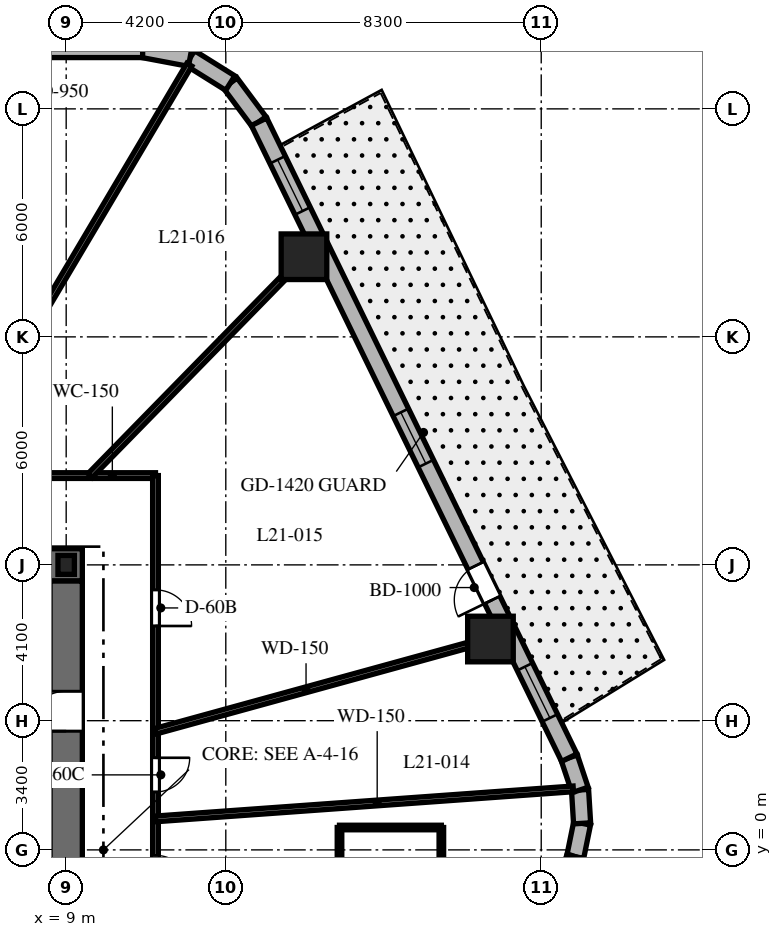
"""IFC4 building model, lengths in metres.
Left out: names, types, materials, properties, quantities, classifications, styles, units other than length and angle.
Written with IfcOpenShell. Run it as: python <this file> out.ifc"""

import sys

from ifc_helpers import new_model, si_unit, direction, frame, frame_2d, origin, origin_2d, place, context, subcontext, project, spatial, rectangle, i_section, extrude, element, fill, save


model = new_model("IFC4")
c1 = context("Model", 3, precision=1e-05, world=origin(), true_north=direction((0.0, 1.0)))
c2 = subcontext(c1, "Body", "Model", "MODEL_VIEW")
j1 = project(units=[si_unit("LENGTHUNIT", "METRE"), si_unit("PLANEANGLEUNIT", "RADIAN")], contexts=[c1])
p1 = place(None, origin())
s1 = spatial("IfcSite", under=j1, at=p1, CompositionType="ELEMENT")
p2 = place(p1, origin())
s2 = spatial("IfcBuilding", under=s1, at=p2, CompositionType="ELEMENT")
p3 = place(p2, frame((0.0, 0.0, 91.4)))
s3 = spatial("IfcBuildingStorey", under=s2, at=p3, CompositionType="ELEMENT", Elevation=91.4)
p4 = place(p3, frame((1.85, 7.5, 0.0), z_axis=(0.0, 0.0, 1.0), x_axis=(1.0, 0.0, 0.0)))
e1 = element("IfcWall", 1, at=p4, inside=s3, PredefinedType="SHEAR", context=c2, shape_type="SweptSolid", body=[
    extrude(rectangle(XDim=7.575, YDim=0.85, at=frame_2d((3.788, 0.0))), origin(), (0.0, 0.0, 1.0), 3.7),
])
p5 = place(p3, frame((9.0, -7.075, 0.0), z_axis=(0.0, 0.0, 1.0), x_axis=(0.0, 1.0, 0.0)))
e2 = element("IfcWall", 2, at=p5, inside=s3, PredefinedType="SHEAR", context=c2, shape_type="SweptSolid", body=[
    extrude(rectangle(XDim=14.15, YDim=0.85, at=frame_2d((7.075, 0.0))), origin(), (0.0, 0.0, 1.0), 3.7),
])
p6 = place(p5, frame((10.2, 0.0, 0.0)))
e3 = element("IfcOpeningElement", 3, at=p6, cuts=e2, PredefinedType="OPENING", context=c2, shape_type="SweptSolid", body=[
    extrude(rectangle(XDim=1.05, YDim=2.15, at=frame_2d((0.525, 1.075))), frame((0.0, 0.435, 0.0), z_axis=(0.0, -1.0, 0.0), x_axis=(1.0, 0.0, 0.0)), (0.0, 0.0, 1.0), 0.87),
])
p7 = place(p3, frame((9.0, 7.5, 0.0), z_axis=(0.0, 0.0, 1.0), x_axis=(1.0, 0.0, 0.0)))
e4 = element("IfcColumn", 4, at=p7, inside=s3, PredefinedType="COLUMN", context=c2, shape_type="SweptSolid", body=[
    extrude(i_section(OverallWidth=0.432, OverallDepth=0.498, WebThickness=0.056, FlangeThickness=0.089, at=origin_2d()), origin(), (0.0, 0.0, 1.0), 3.7),
])
for number, where, z_axis, x_axis in (
    (5, (20.164, 5.549, 0.0), (0.0, 0.0, 1.0), (1.0, 0.0, 0.0)),
    (6, (15.257, 15.609, 0.0), (0.0, 0.0, 1.0), (1.0, 0.0, 0.0)),
):
    element("IfcColumn", number, at=place(p3, frame(where, z_axis=z_axis, x_axis=x_axis)), inside=s3, PredefinedType="COLUMN", context=c2, shape_type="SweptSolid", body=[
        extrude(rectangle(XDim=1.2, YDim=1.2, at=origin_2d()), origin(), (0.0, 0.0, 1.0), 3.7),
    ])
p8 = place(p3, frame((22.397, -0.179, 0.0), z_axis=(0.0, 0.0, 1.0), x_axis=(0.199313589404, 0.979935759669, 0.0)))
e7 = element("IfcWall", 7, at=p8, inside=s3, PredefinedType="SOLIDWALL", context=c2, shape_type="SweptSolid", body=[
    extrude(rectangle(XDim=0.896, YDim=0.45, at=frame_2d((0.448, 0.0))), origin(), (0.0, 0.0, 1.0), 3.4),
])
p9 = place(p3, frame((22.575, 0.698, 0.0), z_axis=(0.0, 0.0, 1.0), x_axis=(-0.060980441946, 0.998138961117, 0.0)))
e8 = element("IfcWall", 8, at=p9, inside=s3, PredefinedType="SOLIDWALL", context=c2, shape_type="SweptSolid", body=[
    extrude(rectangle(XDim=0.881, YDim=0.45, at=frame_2d((0.44, 0.0))), origin(), (0.0, 0.0, 1.0), 3.4),
])
p10 = place(p3, frame((22.522, 1.577, 0.0), z_axis=(0.0, 0.0, 1.0), x_axis=(-0.317372694837, 0.948300887151, 0.0)))
e9 = element("IfcWall", 9, at=p10, inside=s3, PredefinedType="SOLIDWALL", context=c2, shape_type="SweptSolid", body=[
    extrude(rectangle(XDim=0.896, YDim=0.45, at=frame_2d((0.448, 0.0))), origin(), (0.0, 0.0, 1.0), 3.4),
])
p11 = place(p3, frame((14.076, 19.161, 0.0), z_axis=(0.0, 0.0, 1.0), x_axis=(-0.597226657159, 0.802072515412, 0.0)))
e10 = element("IfcWall", 10, at=p11, inside=s3, PredefinedType="SOLIDWALL", context=c2, shape_type="SweptSolid", body=[
    extrude(rectangle(XDim=1.269, YDim=0.45, at=frame_2d((0.635, 0.0))), origin(), (0.0, 0.0, 1.0), 3.4),
])
p12 = place(p3, frame((13.318, 20.179, 0.0), z_axis=(0.0, 0.0, 1.0), x_axis=(-0.848031272749, 0.529946186362, 0.0)))
e11 = element("IfcWall", 11, at=p12, inside=s3, PredefinedType="SOLIDWALL", context=c2, shape_type="SweptSolid", body=[
    extrude(rectangle(XDim=1.248, YDim=0.45, at=frame_2d((0.624, 0.0))), origin(), (0.0, 0.0, 1.0), 3.4),
])
p13 = place(p3, frame((12.259, 20.84, 0.0), z_axis=(0.0, 0.0, 1.0), x_axis=(-0.982730354425, 0.185043374624, 0.0)))
e12 = element("IfcWall", 12, at=p13, inside=s3, PredefinedType="SOLIDWALL", context=c2, shape_type="SweptSolid", body=[
    extrude(rectangle(XDim=1.269, YDim=0.45, at=frame_2d((0.635, 0.0))), origin(), (0.0, 0.0, 1.0), 3.4),
])
p14 = place(p3, frame((15.992, -18.777, 0.0), z_axis=(0.0, 0.0, 1.0), x_axis=(0.325606988926, 0.945505202927, 0.0)))
e13 = element("IfcWall", 13, at=p14, inside=s3, PredefinedType="SOLIDWALL", context=c2, shape_type="SweptSolid", body=[
    extrude(rectangle(XDim=19.669, YDim=0.45, at=frame_2d((9.835, 0.0))), origin(), (0.0, 0.0, 1.0), 3.4),
])
p15 = place(p14, frame((1.197, 0.0, 0.8)))
e14 = element("IfcOpeningElement", 14, at=p15, cuts=e13, PredefinedType="OPENING", context=c2, shape_type="SweptSolid", body=[
    extrude(rectangle(XDim=1.5, YDim=1.8, at=frame_2d((0.75, 0.9))), frame((0.0, 0.235, 0.0), z_axis=(0.0, -1.0, 0.0), x_axis=(1.0, 0.0, 0.0)), (0.0, 0.0, 1.0), 0.47),
])
p16 = place(p14, frame((6.368, 0.0, 0.8)))
e15 = element("IfcOpeningElement", 15, at=p16, cuts=e13, PredefinedType="OPENING", context=c2, shape_type="SweptSolid", body=[
    extrude(rectangle(XDim=1.5, YDim=1.8, at=frame_2d((0.75, 0.9))), frame((0.0, 0.235, 0.0), z_axis=(0.0, -1.0, 0.0), x_axis=(1.0, 0.0, 0.0)), (0.0, 0.0, 1.0), 0.47),
])
p17 = place(p14, frame((11.885, 0.0, 0.8)))
e16 = element("IfcOpeningElement", 16, at=p17, cuts=e13, PredefinedType="OPENING", context=c2, shape_type="SweptSolid", body=[
    extrude(rectangle(XDim=1.5, YDim=1.8, at=frame_2d((0.75, 0.9))), frame((0.0, 0.235, 0.0), z_axis=(0.0, -1.0, 0.0), x_axis=(1.0, 0.0, 0.0)), (0.0, 0.0, 1.0), 0.47),
])
p18 = place(p14, frame((16.918, 0.0, 0.8)))
e17 = element("IfcOpeningElement", 17, at=p18, cuts=e13, PredefinedType="OPENING", context=c2, shape_type="SweptSolid", body=[
    extrude(rectangle(XDim=1.5, YDim=1.8, at=frame_2d((0.75, 0.9))), frame((0.0, 0.235, 0.0), z_axis=(0.0, -1.0, 0.0), x_axis=(1.0, 0.0, 0.0)), (0.0, 0.0, 1.0), 0.47),
])
p19 = place(p3, frame((22.238, 2.427, 0.0), z_axis=(0.0, 0.0, 1.0), x_axis=(-0.438374803278, 0.898792262901, 0.0)))
e18 = element("IfcWall", 18, at=p19, inside=s3, PredefinedType="SOLIDWALL", context=c2, shape_type="SweptSolid", body=[
    extrude(rectangle(XDim=18.618, YDim=0.45, at=frame_2d((9.309, 0.0))), origin(), (0.0, 0.0, 1.0), 3.4),
])
p20 = place(p19, frame((4.62, 0.0, 0.0)))
e19 = element("IfcOpeningElement", 19, at=p20, cuts=e18, PredefinedType="OPENING", context=c2, shape_type="SweptSolid", body=[
    extrude(rectangle(XDim=1.0, YDim=2.15, at=frame_2d((0.5, 1.075))), frame((0.0, 0.235, 0.0), z_axis=(0.0, -1.0, 0.0), x_axis=(1.0, 0.0, 0.0)), (0.0, 0.0, 1.0), 0.47),
])
p21 = place(p19, frame((1.163, 0.0, 0.8)))
e20 = element("IfcOpeningElement", 20, at=p21, cuts=e18, PredefinedType="OPENING", context=c2, shape_type="SweptSolid", body=[
    extrude(rectangle(XDim=1.5, YDim=1.8, at=frame_2d((0.75, 0.9))), frame((0.0, 0.235, 0.0), z_axis=(0.0, -1.0, 0.0), x_axis=(1.0, 0.0, 0.0)), (0.0, 0.0, 1.0), 0.47),
])
p22 = place(p19, frame((8.61, 0.0, 0.8)))
e21 = element("IfcOpeningElement", 21, at=p22, cuts=e18, PredefinedType="OPENING", context=c2, shape_type="SweptSolid", body=[
    extrude(rectangle(XDim=1.5, YDim=1.8, at=frame_2d((0.75, 0.9))), frame((0.0, 0.235, 0.0), z_axis=(0.0, -1.0, 0.0), x_axis=(1.0, 0.0, 0.0)), (0.0, 0.0, 1.0), 0.47),
])
p23 = place(p19, frame((16.006, 0.0, 0.8)))
e22 = element("IfcOpeningElement", 22, at=p23, cuts=e18, PredefinedType="OPENING", context=c2, shape_type="SweptSolid", body=[
    extrude(rectangle(XDim=1.5, YDim=1.8, at=frame_2d((0.75, 0.9))), frame((0.0, 0.235, 0.0), z_axis=(0.0, -1.0, 0.0), x_axis=(1.0, 0.0, 0.0)), (0.0, 0.0, 1.0), 0.47),
])
p24 = place(p3, frame((11.012, 21.075, 0.0), z_axis=(0.0, 0.0, 1.0), x_axis=(-1.0, 0.0, 0.0)))
e23 = element("IfcWall", 23, at=p24, inside=s3, PredefinedType="SOLIDWALL", context=c2, shape_type="SweptSolid", body=[
    extrude(rectangle(XDim=23.782, YDim=0.45, at=frame_2d((11.891, 0.0))), origin(), (0.0, 0.0, 1.0), 3.4),
])
p25 = place(p24, frame((2.473, 0.0, 0.0)))
e24 = element("IfcOpeningElement", 24, at=p25, cuts=e23, PredefinedType="OPENING", context=c2, shape_type="SweptSolid", body=[
    extrude(rectangle(XDim=0.95, YDim=2.15, at=frame_2d((0.475, 1.075))), frame((0.0, 0.235, 0.0), z_axis=(0.0, -1.0, 0.0), x_axis=(1.0, 0.0, 0.0)), (0.0, 0.0, 1.0), 0.47),
])
p26 = place(p24, frame((8.244, 0.0, 0.8)))
e25 = element("IfcOpeningElement", 25, at=p26, cuts=e23, PredefinedType="OPENING", context=c2, shape_type="SweptSolid", body=[
    extrude(rectangle(XDim=1.5, YDim=1.8, at=frame_2d((0.75, 0.9))), frame((0.0, 0.235, 0.0), z_axis=(0.0, -1.0, 0.0), x_axis=(1.0, 0.0, 0.0)), (0.0, 0.0, 1.0), 0.47),
])
p27 = place(p24, frame((14.811, 0.0, 0.8)))
e26 = element("IfcOpeningElement", 26, at=p27, cuts=e23, PredefinedType="OPENING", context=c2, shape_type="SweptSolid", body=[
    extrude(rectangle(XDim=1.5, YDim=1.8, at=frame_2d((0.75, 0.9))), frame((0.0, 0.235, 0.0), z_axis=(0.0, -1.0, 0.0), x_axis=(1.0, 0.0, 0.0)), (0.0, 0.0, 1.0), 0.47),
])
p28 = place(p24, frame((20.741, 0.0, 0.8)))
e27 = element("IfcOpeningElement", 27, at=p28, cuts=e23, PredefinedType="OPENING", context=c2, shape_type="SweptSolid", body=[
    extrude(rectangle(XDim=1.5, YDim=1.8, at=frame_2d((0.75, 0.9))), frame((0.0, 0.235, 0.0), z_axis=(0.0, -1.0, 0.0), x_axis=(1.0, 0.0, 0.0)), (0.0, 0.0, 1.0), 0.47),
])
p29 = place(p3, frame((-11.35, 9.85, 0.0), z_axis=(0.0, 0.0, 1.0), x_axis=(1.0, 0.0, 0.0)))
e28 = element("IfcWall", 28, at=p29, inside=s3, PredefinedType="PARTITIONING", context=c2, shape_type="SweptSolid", body=[
    extrude(rectangle(XDim=22.7, YDim=0.15, at=frame_2d((11.35, 0.0))), origin(), (0.0, 0.0, 1.0), 2.84),
])
p30 = place(p29, frame((18.679, 0.0, 0.0)))
e29 = element("IfcOpeningElement", 29, at=p30, cuts=e28, PredefinedType="OPENING", context=c2, shape_type="SweptSolid", body=[
    extrude(rectangle(XDim=0.9, YDim=2.03, at=frame_2d((0.45, 1.015))), frame((0.0, 0.085, 0.0), z_axis=(0.0, -1.0, 0.0), x_axis=(1.0, 0.0, 0.0)), (0.0, 0.0, 1.0), 0.17),
])
p31 = place(p29, frame((15.337, 0.0, 0.0)))
e30 = element("IfcOpeningElement", 30, at=p31, cuts=e28, PredefinedType="OPENING", context=c2, shape_type="SweptSolid", body=[
    extrude(rectangle(XDim=0.9, YDim=2.03, at=frame_2d((0.45, 1.015))), frame((0.0, 0.085, 0.0), z_axis=(0.0, -1.0, 0.0), x_axis=(1.0, 0.0, 0.0)), (0.0, 0.0, 1.0), 0.17),
])
p32 = place(p29, frame((11.994, 0.0, 0.0)))
e31 = element("IfcOpeningElement", 31, at=p32, cuts=e28, PredefinedType="OPENING", context=c2, shape_type="SweptSolid", body=[
    extrude(rectangle(XDim=0.95, YDim=2.03, at=frame_2d((0.475, 1.015))), frame((0.0, 0.085, 0.0), z_axis=(0.0, -1.0, 0.0), x_axis=(1.0, 0.0, 0.0)), (0.0, 0.0, 1.0), 0.17),
])
p33 = place(p29, frame((8.559, 0.0, 0.0)))
e32 = element("IfcOpeningElement", 32, at=p33, cuts=e28, PredefinedType="OPENING", context=c2, shape_type="SweptSolid", body=[
    extrude(rectangle(XDim=0.95, YDim=2.03, at=frame_2d((0.475, 1.015))), frame((0.0, 0.085, 0.0), z_axis=(0.0, -1.0, 0.0), x_axis=(1.0, 0.0, 0.0)), (0.0, 0.0, 1.0), 0.17),
])
p34 = place(p29, frame((5.728, 0.0, 0.0)))
e33 = element("IfcOpeningElement", 33, at=p34, cuts=e28, PredefinedType="OPENING", context=c2, shape_type="SweptSolid", body=[
    extrude(rectangle(XDim=0.9, YDim=2.03, at=frame_2d((0.45, 1.015))), frame((0.0, 0.085, 0.0), z_axis=(0.0, -1.0, 0.0), x_axis=(1.0, 0.0, 0.0)), (0.0, 0.0, 1.0), 0.17),
])
p35 = place(p29, frame((2.093, 0.0, 0.0)))
e34 = element("IfcOpeningElement", 34, at=p35, cuts=e28, PredefinedType="OPENING", context=c2, shape_type="SweptSolid", body=[
    extrude(rectangle(XDim=0.95, YDim=2.03, at=frame_2d((0.475, 1.015))), frame((0.0, 0.085, 0.0), z_axis=(0.0, -1.0, 0.0), x_axis=(1.0, 0.0, 0.0)), (0.0, 0.0, 1.0), 0.17),
])
p36 = place(p3, frame((11.35, 9.85, 0.0), z_axis=(0.0, 0.0, 1.0), x_axis=(0.0, -1.0, 0.0)))
e35 = element("IfcWall", 35, at=p36, inside=s3, PredefinedType="PARTITIONING", context=c2, shape_type="SweptSolid", body=[
    extrude(rectangle(XDim=19.7, YDim=0.15, at=frame_2d((9.85, 0.0))), origin(), (0.0, 0.0, 1.0), 2.84),
])
p37 = place(p36, frame((7.426, 0.0, 0.0)))
e36 = element("IfcOpeningElement", 36, at=p37, cuts=e35, PredefinedType="OPENING", context=c2, shape_type="SweptSolid", body=[
    extrude(rectangle(XDim=0.9, YDim=2.03, at=frame_2d((0.45, 1.015))), frame((0.0, 0.085, 0.0), z_axis=(0.0, -1.0, 0.0), x_axis=(1.0, 0.0, 0.0)), (0.0, 0.0, 1.0), 0.17),
])
p38 = place(p36, frame((3.008, 0.0, 0.0)))
e37 = element("IfcOpeningElement", 37, at=p38, cuts=e35, PredefinedType="OPENING", context=c2, shape_type="SweptSolid", body=[
    extrude(rectangle(XDim=0.95, YDim=2.03, at=frame_2d((0.475, 1.015))), frame((0.0, 0.085, 0.0), z_axis=(0.0, -1.0, 0.0), x_axis=(1.0, 0.0, 0.0)), (0.0, 0.0, 1.0), 0.17),
])
p39 = place(p36, frame((16.938, 0.0, 0.0)))
e38 = element("IfcOpeningElement", 38, at=p39, cuts=e35, PredefinedType="OPENING", context=c2, shape_type="SweptSolid", body=[
    extrude(rectangle(XDim=0.95, YDim=2.03, at=frame_2d((0.475, 1.015))), frame((0.0, 0.085, 0.0), z_axis=(0.0, -1.0, 0.0), x_axis=(1.0, 0.0, 0.0)), (0.0, 0.0, 1.0), 0.17),
])
p40 = place(p36, frame((13.171, 0.0, 0.0)))
e39 = element("IfcOpeningElement", 39, at=p40, cuts=e35, PredefinedType="OPENING", context=c2, shape_type="SweptSolid", body=[
    extrude(rectangle(XDim=0.95, YDim=2.03, at=frame_2d((0.475, 1.015))), frame((0.0, 0.085, 0.0), z_axis=(0.0, -1.0, 0.0), x_axis=(1.0, 0.0, 0.0)), (0.0, 0.0, 1.0), 0.17),
])
p41 = place(p36, frame((9.994, 0.0, 0.0)))
e40 = element("IfcOpeningElement", 40, at=p41, cuts=e35, PredefinedType="OPENING", context=c2, shape_type="SweptSolid", body=[
    extrude(rectangle(XDim=0.95, YDim=2.03, at=frame_2d((0.475, 1.015))), frame((0.0, 0.085, 0.0), z_axis=(0.0, -1.0, 0.0), x_axis=(1.0, 0.0, 0.0)), (0.0, 0.0, 1.0), 0.17),
])
p42 = place(p3, frame((11.35, 0.816, 0.0), z_axis=(0.0, 0.0, 1.0), x_axis=(0.997427684746, 0.071679939324, 0.0)))
e41 = element("IfcWall", 41, at=p42, inside=s3, PredefinedType="PARTITIONING", context=c2, shape_type="SweptSolid", body=[
    extrude(rectangle(XDim=11.022, YDim=0.15, at=frame_2d((5.511, 0.0))), origin(), (0.0, 0.0, 1.0), 2.54),
])
p43 = place(p3, frame((11.35, 3.123, 0.0), z_axis=(0.0, 0.0, 1.0), x_axis=(0.964151983214, 0.265350623261, 0.0)))
e42 = element("IfcWall", 42, at=p43, inside=s3, PredefinedType="PARTITIONING", context=c2, shape_type="SweptSolid", body=[
    extrude(rectangle(XDim=9.645, YDim=0.15, at=frame_2d((4.823, 0.0))), origin(), (0.0, 0.0, 1.0), 2.54),
])
p44 = place(p3, frame((9.628, 9.85, 0.0), z_axis=(0.0, 0.0, 1.0), x_axis=(0.698992824326, 0.715128681805, 0.0)))
e43 = element("IfcWall", 43, at=p44, inside=s3, PredefinedType="PARTITIONING", context=c2, shape_type="SweptSolid", body=[
    extrude(rectangle(XDim=8.579, YDim=0.15, at=frame_2d((4.29, 0.0))), origin(), (0.0, 0.0, 1.0), 2.54),
])
p45 = place(p3, frame((5.835, 9.85, 0.0), z_axis=(0.0, 0.0, 1.0), x_axis=(0.509682574642, 0.860362524234, 0.0)))
e44 = element("IfcWall", 44, at=p45, inside=s3, PredefinedType="PARTITIONING", context=c2, shape_type="SweptSolid", body=[
    extrude(rectangle(XDim=12.568, YDim=0.15, at=frame_2d((6.284, 0.0))), origin(), (0.0, 0.0, 1.0), 2.54),
])
p46 = place(p3, frame((18.872, -1.951, 0.0), z_axis=(0.0, 0.0, 1.0), x_axis=(0.0, 1.0, 0.0)))
e45 = element("IfcWall", 45, at=p46, inside=s3, PredefinedType="PARTITIONING", context=c2, shape_type="SweptSolid", body=[
    extrude(rectangle(XDim=2.54, YDim=0.12, at=frame_2d((1.27, 0.0))), origin(), (0.0, 0.0, 1.0), 3.4),
])
p47 = place(p3, frame((18.872, 0.589, 0.0), z_axis=(0.0, 0.0, 1.0), x_axis=(-1.0, 0.0, 0.0)))
e46 = element("IfcWall", 46, at=p47, inside=s3, PredefinedType="PARTITIONING", context=c2, shape_type="SweptSolid", body=[
    extrude(rectangle(XDim=2.68, YDim=0.12, at=frame_2d((1.34, 0.0))), origin(), (0.0, 0.0, 1.0), 2.841),
])
p48 = place(p3, frame((16.192, 0.589, 0.0), z_axis=(0.0, 0.0, 1.0), x_axis=(0.0, -1.0, 0.0)))
e47 = element("IfcWall", 47, at=p48, inside=s3, PredefinedType="PARTITIONING", context=c2, shape_type="SweptSolid", body=[
    extrude(rectangle(XDim=2.54, YDim=0.12, at=frame_2d((1.27, 0.0))), origin(), (0.0, 0.0, 1.0), 3.4),
])
p49 = place(p20, origin())
e48 = element("IfcDoor", 48, at=p49, inside=s3, OperationType="SINGLE_SWING_LEFT", PredefinedType="DOOR", context=c2, shape_type="SweptSolid", body=[
    extrude(rectangle(XDim=1.0, YDim=2.15, at=frame_2d((0.5, 1.075))), frame((0.0, 0.025, 0.0), z_axis=(0.0, -1.0, 0.0), x_axis=(1.0, 0.0, 0.0)), (0.0, 0.0, 1.0), 0.05),
])
fill(e19, e48)
p50 = place(p21, origin())
e49 = element("IfcWindow", 49, at=p50, inside=s3, PartitioningType="SINGLE_PANEL", PredefinedType="WINDOW", context=c2, shape_type="SweptSolid", body=[
    extrude(rectangle(XDim=1.5, YDim=1.8, at=frame_2d((0.75, 0.9))), frame((0.0, 0.03, 0.0), z_axis=(0.0, -1.0, 0.0), x_axis=(1.0, 0.0, 0.0)), (0.0, 0.0, 1.0), 0.06),
])
fill(e20, e49)
p51 = place(p22, origin())
e50 = element("IfcWindow", 50, at=p51, inside=s3, PartitioningType="SINGLE_PANEL", PredefinedType="WINDOW", context=c2, shape_type="SweptSolid", body=[
    extrude(rectangle(XDim=1.5, YDim=1.8, at=frame_2d((0.75, 0.9))), frame((0.0, 0.03, 0.0), z_axis=(0.0, -1.0, 0.0), x_axis=(1.0, 0.0, 0.0)), (0.0, 0.0, 1.0), 0.06),
])
fill(e21, e50)
p52 = place(p23, origin())
e51 = element("IfcWindow", 51, at=p52, inside=s3, PartitioningType="SINGLE_PANEL", PredefinedType="WINDOW", context=c2, shape_type="SweptSolid", body=[
    extrude(rectangle(XDim=1.5, YDim=1.8, at=frame_2d((0.75, 0.9))), frame((0.0, 0.03, 0.0), z_axis=(0.0, -1.0, 0.0), x_axis=(1.0, 0.0, 0.0)), (0.0, 0.0, 1.0), 0.06),
])
fill(e22, e51)
p53 = place(p6, origin())
e52 = element("IfcDoor", 52, at=p53, inside=s3, OperationType="SINGLE_SWING_LEFT", PredefinedType="DOOR", context=c2, shape_type="SweptSolid", body=[
    extrude(rectangle(XDim=1.05, YDim=2.15, at=frame_2d((0.525, 1.075))), frame((0.0, 0.025, 0.0), z_axis=(0.0, -1.0, 0.0), x_axis=(1.0, 0.0, 0.0)), (0.0, 0.0, 1.0), 0.05),
])
fill(e3, e52)
p54 = place(p37, origin())
e53 = element("IfcDoor", 53, at=p54, inside=s3, OperationType="SINGLE_SWING_LEFT", PredefinedType="DOOR", context=c2, shape_type="SweptSolid", body=[
    extrude(rectangle(XDim=0.9, YDim=2.03, at=frame_2d((0.45, 1.015))), frame((0.0, 0.025, 0.0), z_axis=(0.0, -1.0, 0.0), x_axis=(1.0, 0.0, 0.0)), (0.0, 0.0, 1.0), 0.05),
])
fill(e36, e53)
p55 = place(p38, origin())
e54 = element("IfcDoor", 54, at=p55, inside=s3, OperationType="SINGLE_SWING_RIGHT", PredefinedType="DOOR", context=c2, shape_type="SweptSolid", body=[
    extrude(rectangle(XDim=0.95, YDim=2.03, at=frame_2d((0.475, 1.015))), frame((0.0, 0.025, 0.0), z_axis=(0.0, -1.0, 0.0), x_axis=(1.0, 0.0, 0.0)), (0.0, 0.0, 1.0), 0.05),
])
fill(e37, e54)
p56 = place(p41, origin())
e55 = element("IfcDoor", 55, at=p56, inside=s3, OperationType="SINGLE_SWING_RIGHT", PredefinedType="DOOR", context=c2, shape_type="SweptSolid", body=[
    extrude(rectangle(XDim=0.95, YDim=2.03, at=frame_2d((0.475, 1.015))), frame((0.0, 0.025, 0.0), z_axis=(0.0, -1.0, 0.0), x_axis=(1.0, 0.0, 0.0)), (0.0, 0.0, 1.0), 0.05),
])
fill(e40, e55)
save(model, sys.argv[1])
